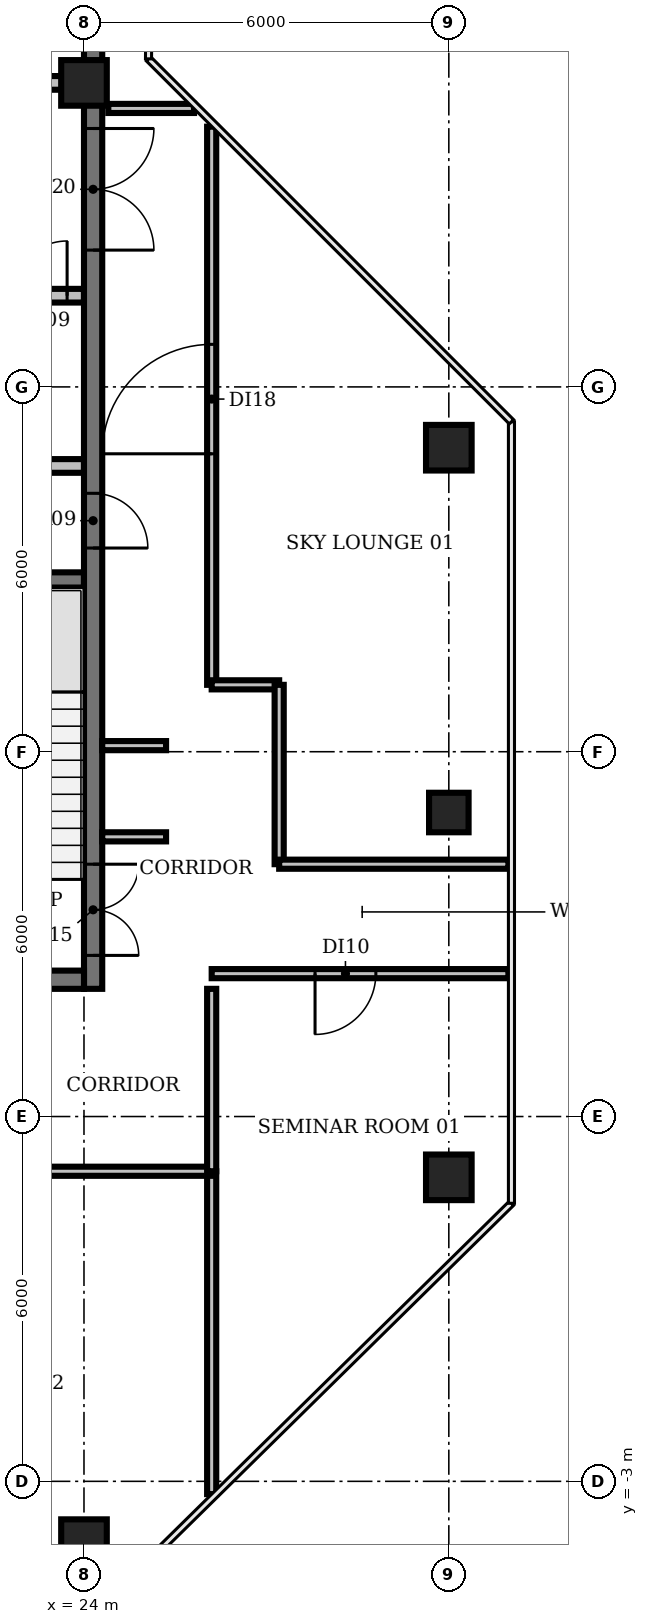
"""IFC4 building model, lengths in metres.
Left out: names, types, materials, properties, quantities, classifications, styles, units other than length and angle.
Written with IfcOpenShell. Run it as: python <this file> out.ifc"""

import sys

from ifc_helpers import new_model, si_unit, direction, frame, frame_2d, origin, origin_2d, place, context, subcontext, project, spatial, rectangle, circle, extrude, element, fill, save


model = new_model("IFC4")
c1 = context("Model", 3, precision=1e-05, world=origin(), true_north=direction((0.0, 1.0)))
c2 = subcontext(c1, "Body", "Model", "MODEL_VIEW")
j1 = project(units=[si_unit("LENGTHUNIT", "METRE"), si_unit("PLANEANGLEUNIT", "RADIAN")], contexts=[c1])
p1 = place(None, origin())
s1 = spatial("IfcSite", under=j1, at=p1, CompositionType="ELEMENT")
p2 = place(p1, origin())
s2 = spatial("IfcBuilding", under=s1, at=p2, CompositionType="ELEMENT")
p3 = place(p2, frame((0.0, 0.0, 335.6)))
s3 = spatial("IfcBuildingStorey", under=s2, at=p3, CompositionType="ELEMENT", Elevation=335.6)
for number, where, z_axis, x_axis in (
    (1, (24.0, -4.0, 0.0), (0.0, 0.0, 1.0), (1.0, 0.0, 0.0)),
    (2, (24.0, 20.0, 0.0), (0.0, 0.0, 1.0), (1.0, 0.0, 0.0)),
    (3, (30.0, 2.0, 0.0), (0.0, 0.0, 1.0), (1.0, 0.0, 0.0)),
):
    element("IfcColumn", number, at=place(p3, frame(where, z_axis=z_axis, x_axis=x_axis)), inside=s3, PredefinedType="COLUMN", context=c2, shape_type="SweptSolid", body=[
        extrude(circle(Radius=0.375, at=origin_2d()), origin(), (0.0, 0.0, 1.0), 3.9),
    ])
p4 = place(p3, frame((30.0, 8.0, 0.0), z_axis=(0.0, 0.0, 1.0), x_axis=(1.0, 0.0, 0.0)))
e4 = element("IfcColumn", 4, at=p4, inside=s3, PredefinedType="COLUMN", context=c2, shape_type="SweptSolid", body=[
    extrude(rectangle(XDim=0.65, YDim=0.65, at=origin_2d()), origin(), (0.0, 0.0, 1.0), 3.9),
])
p5 = place(p3, frame((30.0, 14.0, 0.0), z_axis=(0.0, 0.0, 1.0), x_axis=(1.0, 0.0, 0.0)))
e5 = element("IfcColumn", 5, at=p5, inside=s3, PredefinedType="COLUMN", context=c2, shape_type="SweptSolid", body=[
    extrude(circle(Radius=0.375, at=origin_2d()), origin(), (0.0, 0.0, 1.0), 3.9),
])
p6 = place(p3, frame((20.85, 11.825, 0.0), z_axis=(0.0, 0.0, 1.0), x_axis=(1.0, 0.0, 0.0)))
e6 = element("IfcWall", 6, at=p6, inside=s3, PredefinedType="SHEAR", context=c2, shape_type="SweptSolid", body=[
    extrude(rectangle(XDim=3.15, YDim=0.25, at=frame_2d((1.575, 0.0))), origin(), (0.0, 0.0, 1.0), 3.9),
])
p7 = place(p3, frame((16.6, 13.7, 0.0), z_axis=(0.0, 0.0, 1.0), x_axis=(1.0, 0.0, 0.0)))
e7 = element("IfcWall", 7, at=p7, inside=s3, PredefinedType="PARTITIONING", context=c2, shape_type="SweptSolid", body=[
    extrude(rectangle(XDim=7.4, YDim=0.225, at=frame_2d((3.7, 0.0))), origin(), (0.0, 0.0, 1.0), 3.9),
])
p8 = place(p3, frame((9.4, 16.5, 0.0), z_axis=(0.0, 0.0, 1.0), x_axis=(1.0, 0.0, 0.0)))
e8 = element("IfcWall", 8, at=p8, inside=s3, PredefinedType="PARTITIONING", context=c2, shape_type="SweptSolid", body=[
    extrude(rectangle(XDim=14.6, YDim=0.225, at=frame_2d((7.3, 0.0))), origin(), (0.0, 0.0, 1.0), 3.9),
])
p9 = place(p8, frame((0.85, 0.0, 0.0)))
e9 = element("IfcOpeningElement", 9, at=p9, cuts=e8, PredefinedType="OPENING", context=c2, shape_type="SweptSolid", body=[
    extrude(rectangle(XDim=0.9, YDim=2.1, at=frame_2d((0.45, 1.05))), frame((0.0, 0.123, 0.0), z_axis=(0.0, -1.0, 0.0), x_axis=(1.0, 0.0, 0.0)), (0.0, 0.0, 1.0), 0.245),
])
p10 = place(p8, frame((3.625, 0.0, 0.0)))
e10 = element("IfcOpeningElement", 10, at=p10, cuts=e8, PredefinedType="OPENING", context=c2, shape_type="SweptSolid", body=[
    extrude(rectangle(XDim=0.9, YDim=2.1, at=frame_2d((0.45, 1.05))), frame((0.0, 0.123, 0.0), z_axis=(0.0, -1.0, 0.0), x_axis=(1.0, 0.0, 0.0)), (0.0, 0.0, 1.0), 0.245),
])
p11 = place(p8, frame((7.775, 0.0, 0.0)))
e11 = element("IfcOpeningElement", 11, at=p11, cuts=e8, PredefinedType="OPENING", context=c2, shape_type="SweptSolid", body=[
    extrude(rectangle(XDim=1.0, YDim=2.1, at=frame_2d((0.5, 1.05))), frame((0.0, 0.123, 0.0), z_axis=(0.0, -1.0, 0.0), x_axis=(1.0, 0.0, 0.0)), (0.0, 0.0, 1.0), 0.245),
])
p12 = place(p8, frame((11.647, 0.0, 0.0)))
e12 = element("IfcOpeningElement", 12, at=p12, cuts=e8, PredefinedType="OPENING", context=c2, shape_type="SweptSolid", body=[
    extrude(rectangle(XDim=0.9, YDim=2.1, at=frame_2d((0.45, 1.05))), frame((0.0, 0.123, 0.0), z_axis=(0.0, -1.0, 0.0), x_axis=(1.0, 0.0, 0.0)), (0.0, 0.0, 1.0), 0.245),
])
p13 = place(p8, frame((13.423, 0.0, 0.0)))
e13 = element("IfcOpeningElement", 13, at=p13, cuts=e8, PredefinedType="OPENING", context=c2, shape_type="SweptSolid", body=[
    extrude(rectangle(XDim=0.9, YDim=2.1, at=frame_2d((0.45, 1.05))), frame((0.0, 0.123, 0.0), z_axis=(0.0, -1.0, 0.0), x_axis=(1.0, 0.0, 0.0)), (0.0, 0.0, 1.0), 0.245),
])
p14 = place(p3, frame((24.0, 20.0, 0.0), z_axis=(0.0, 0.0, 1.0), x_axis=(-1.0, 0.0, 0.0)))
e14 = element("IfcWall", 14, at=p14, inside=s3, PredefinedType="PARTITIONING", context=c2, shape_type="SweptSolid", body=[
    extrude(rectangle(XDim=14.6, YDim=0.225, at=frame_2d((7.3, 0.0))), origin(), (0.0, 0.0, 1.0), 3.9),
])
p15 = place(p14, frame((12.75, 0.0, 0.0)))
e15 = element("IfcOpeningElement", 15, at=p15, cuts=e14, PredefinedType="OPENING", context=c2, shape_type="SweptSolid", body=[
    extrude(rectangle(XDim=1.1, YDim=2.1, at=frame_2d((0.55, 1.05))), frame((0.0, 0.123, 0.0), z_axis=(0.0, -1.0, 0.0), x_axis=(1.0, 0.0, 0.0)), (0.0, 0.0, 1.0), 0.245),
])
p16 = place(p14, frame((9.95, 0.0, 0.0)))
e16 = element("IfcOpeningElement", 16, at=p16, cuts=e14, PredefinedType="OPENING", context=c2, shape_type="SweptSolid", body=[
    extrude(rectangle(XDim=1.1, YDim=2.1, at=frame_2d((0.55, 1.05))), frame((0.0, 0.123, 0.0), z_axis=(0.0, -1.0, 0.0), x_axis=(1.0, 0.0, 0.0)), (0.0, 0.0, 1.0), 0.245),
])
p17 = place(p14, frame((7.15, 0.0, 0.0)))
e17 = element("IfcOpeningElement", 17, at=p17, cuts=e14, PredefinedType="OPENING", context=c2, shape_type="SweptSolid", body=[
    extrude(rectangle(XDim=1.1, YDim=2.1, at=frame_2d((0.55, 1.05))), frame((0.0, 0.123, 0.0), z_axis=(0.0, -1.0, 0.0), x_axis=(1.0, 0.0, 0.0)), (0.0, 0.0, 1.0), 0.245),
])
p18 = place(p14, frame((4.35, 0.0, 0.0)))
e18 = element("IfcOpeningElement", 18, at=p18, cuts=e14, PredefinedType="OPENING", context=c2, shape_type="SweptSolid", body=[
    extrude(rectangle(XDim=1.1, YDim=2.1, at=frame_2d((0.55, 1.05))), frame((0.0, 0.123, 0.0), z_axis=(0.0, -1.0, 0.0), x_axis=(1.0, 0.0, 0.0)), (0.0, 0.0, 1.0), 0.245),
])
p19 = place(p14, frame((2.137, 0.0, 0.0)))
e19 = element("IfcOpeningElement", 19, at=p19, cuts=e14, PredefinedType="OPENING", context=c2, shape_type="SweptSolid", body=[
    extrude(rectangle(XDim=0.9, YDim=2.1, at=frame_2d((0.45, 1.05))), frame((0.0, 0.123, 0.0), z_axis=(0.0, -1.0, 0.0), x_axis=(1.0, 0.0, 0.0)), (0.0, 0.0, 1.0), 0.245),
])
p20 = place(p14, frame((0.562, 0.0, 0.0)))
e20 = element("IfcOpeningElement", 20, at=p20, cuts=e14, PredefinedType="OPENING", context=c2, shape_type="SweptSolid", body=[
    extrude(rectangle(XDim=0.9, YDim=2.1, at=frame_2d((0.45, 1.05))), frame((0.0, 0.123, 0.0), z_axis=(0.0, -1.0, 0.0), x_axis=(1.0, 0.0, 0.0)), (0.0, 0.0, 1.0), 0.245),
])
p21 = place(p3, frame((24.15, 25.705, 0.0), z_axis=(0.0, 0.0, 1.0), x_axis=(0.0, -1.0, 0.0)))
e21 = element("IfcWall", 21, at=p21, inside=s3, PredefinedType="SHEAR", context=c2, shape_type="SweptSolid", body=[
    extrude(rectangle(XDim=20.605, YDim=0.3, at=frame_2d((10.302, 0.0))), origin(), (0.0, 0.0, 1.0), 3.9),
])
p22 = place(p21, frame((18.555, 0.0, 0.0)))
e22 = element("IfcOpeningElement", 22, at=p22, cuts=e21, PredefinedType="OPENING", context=c2, shape_type="SweptSolid", body=[
    extrude(rectangle(XDim=1.5, YDim=2.1, at=frame_2d((0.75, 1.05))), frame((0.0, 0.16, 0.0), z_axis=(0.0, -1.0, 0.0), x_axis=(1.0, 0.0, 0.0)), (0.0, 0.0, 1.0), 0.32),
])
p23 = place(p21, frame((12.455, 0.0, 0.0)))
e23 = element("IfcOpeningElement", 23, at=p23, cuts=e21, PredefinedType="OPENING", context=c2, shape_type="SweptSolid", body=[
    extrude(rectangle(XDim=0.9, YDim=2.1, at=frame_2d((0.45, 1.05))), frame((0.0, 0.16, 0.0), z_axis=(0.0, -1.0, 0.0), x_axis=(1.0, 0.0, 0.0)), (0.0, 0.0, 1.0), 0.32),
])
p24 = place(p21, frame((6.455, 0.0, 0.0)))
e24 = element("IfcOpeningElement", 24, at=p24, cuts=e21, PredefinedType="OPENING", context=c2, shape_type="SweptSolid", body=[
    extrude(rectangle(XDim=2.0, YDim=2.1, at=frame_2d((1.0, 1.05))), frame((0.0, 0.16, 0.0), z_axis=(0.0, -1.0, 0.0), x_axis=(1.0, 0.0, 0.0)), (0.0, 0.0, 1.0), 0.32),
])
p25 = place(p3, frame((24.0, 5.25, 0.0), z_axis=(0.0, 0.0, 1.0), x_axis=(-1.0, 0.0, 0.0)))
e25 = element("IfcWall", 25, at=p25, inside=s3, PredefinedType="SHEAR", context=c2, shape_type="SweptSolid", body=[
    extrude(rectangle(XDim=18.0, YDim=0.3, at=frame_2d((9.0, 0.0))), origin(), (0.0, 0.0, 1.0), 3.9),
])
p26 = place(p25, frame((13.0, 0.0, 0.0)))
e26 = element("IfcOpeningElement", 26, at=p26, cuts=e25, PredefinedType="OPENING", context=c2, shape_type="SweptSolid", body=[
    extrude(rectangle(XDim=1.2, YDim=2.1, at=frame_2d((0.6, 1.05))), frame((0.0, 0.16, 0.0), z_axis=(0.0, -1.0, 0.0), x_axis=(1.0, 0.0, 0.0)), (0.0, 0.0, 1.0), 0.32),
])
p27 = place(p25, frame((4.9, 0.0, 0.0)))
e27 = element("IfcOpeningElement", 27, at=p27, cuts=e25, PredefinedType="OPENING", context=c2, shape_type="SweptSolid", body=[
    extrude(rectangle(XDim=1.0, YDim=2.1, at=frame_2d((0.5, 1.05))), frame((0.0, 0.16, 0.0), z_axis=(0.0, -1.0, 0.0), x_axis=(1.0, 0.0, 0.0)), (0.0, 0.0, 1.0), 0.32),
])
for number, where, z_axis, x_axis in (
    (28, (24.3, 7.6, 0.0), (0.0, 0.0, 1.0), (1.0, 0.0, 0.0)),
    (29, (24.3, 9.1, 0.0), (0.0, 0.0, 1.0), (1.0, 0.0, 0.0)),
):
    element("IfcWall", number, at=place(p3, frame(where, z_axis=z_axis, x_axis=x_axis)), inside=s3, PredefinedType="PARTITIONING", context=c2, shape_type="SweptSolid", body=[
        extrude(rectangle(XDim=1.05, YDim=0.15, at=frame_2d((0.525, 0.0))), origin(), (0.0, 0.0, 1.0), 2.95),
    ])
p28 = place(p3, frame((24.4, 19.58, 0.0), z_axis=(0.0, 0.0, 1.0), x_axis=(1.0, 0.0, 0.0)))
e30 = element("IfcWall", 30, at=p28, inside=s3, PredefinedType="PARTITIONING", context=c2, shape_type="SweptSolid", body=[
    extrude(rectangle(XDim=1.41, YDim=0.15, at=frame_2d((0.705, 0.0))), origin(), (0.0, 0.0, 1.0), 2.95),
])
p29 = place(p3, frame((26.1, -3.21, 0.0), z_axis=(0.0, 0.0, 1.0), x_axis=(0.0, 1.0, 0.0)))
e31 = element("IfcWall", 31, at=p29, inside=s3, PredefinedType="PARTITIONING", context=c2, shape_type="SweptSolid", body=[
    extrude(rectangle(XDim=5.31, YDim=0.15, at=frame_2d((2.655, 0.0))), origin(), (0.0, 0.0, 1.0), 2.95),
])
p30 = place(p3, frame((26.1, 2.1, 0.0), z_axis=(0.0, 0.0, 1.0), x_axis=(-1.0, 0.0, 0.0)))
e32 = element("IfcWall", 32, at=p30, inside=s3, PredefinedType="PARTITIONING", context=c2, shape_type="SweptSolid", body=[
    extrude(rectangle(XDim=22.2, YDim=0.15, at=frame_2d((11.1, 0.0))), origin(), (0.0, 0.0, 1.0), 2.95),
])
p31 = place(p30, frame((10.6, 0.0, 0.0)))
e33 = element("IfcOpeningElement", 33, at=p31, cuts=e32, PredefinedType="OPENING", context=c2, shape_type="SweptSolid", body=[
    extrude(rectangle(XDim=1.2, YDim=2.1, at=frame_2d((0.6, 1.05))), frame((0.0, 0.085, 0.0), z_axis=(0.0, -1.0, 0.0), x_axis=(1.0, 0.0, 0.0)), (0.0, 0.0, 1.0), 0.17),
])
p32 = place(p3, frame((26.1, 2.1, 0.0), z_axis=(0.0, 0.0, 1.0), x_axis=(0.0, 1.0, 0.0)))
e34 = element("IfcWall", 34, at=p32, inside=s3, PredefinedType="PARTITIONING", context=c2, shape_type="SweptSolid", body=[
    extrude(rectangle(XDim=3.0, YDim=0.15, at=frame_2d((1.5, 0.0))), origin(), (0.0, 0.0, 1.0), 2.95),
])
p33 = place(p3, frame((26.1, 10.1, 0.0), z_axis=(0.0, 0.0, 1.0), x_axis=(0.0, 1.0, 0.0)))
e35 = element("IfcWall", 35, at=p33, inside=s3, PredefinedType="PARTITIONING", context=c2, shape_type="SweptSolid", body=[
    extrude(rectangle(XDim=9.18, YDim=0.15, at=frame_2d((4.59, 0.0))), origin(), (0.0, 0.0, 1.0), 2.95),
])
p34 = place(p33, frame((3.8, 0.0, 0.0)))
e36 = element("IfcOpeningElement", 36, at=p34, cuts=e35, PredefinedType="OPENING", context=c2, shape_type="SweptSolid", body=[
    extrude(rectangle(XDim=1.8, YDim=2.1, at=frame_2d((0.9, 1.05))), frame((0.0, 0.085, 0.0), z_axis=(0.0, -1.0, 0.0), x_axis=(1.0, 0.0, 0.0)), (0.0, 0.0, 1.0), 0.17),
])
p35 = place(p3, frame((26.1, 10.1, 0.0), z_axis=(0.0, 0.0, 1.0), x_axis=(1.0, 0.0, 0.0)))
e37 = element("IfcWall", 37, at=p35, inside=s3, PredefinedType="PARTITIONING", context=c2, shape_type="SweptSolid", body=[
    extrude(rectangle(XDim=1.11, YDim=0.15, at=frame_2d((0.555, 0.0))), origin(), (0.0, 0.0, 1.0), 2.95),
])
p36 = place(p3, frame((27.21, 7.15, 0.0), z_axis=(0.0, 0.0, 1.0), x_axis=(0.0, 1.0, 0.0)))
e38 = element("IfcWall", 38, at=p36, inside=s3, PredefinedType="PARTITIONING", context=c2, shape_type="SweptSolid", body=[
    extrude(rectangle(XDim=2.95, YDim=0.15, at=frame_2d((1.475, 0.0))), origin(), (0.0, 0.0, 1.0), 2.95),
])
p37 = place(p3, frame((27.21, 7.15, 0.0), z_axis=(0.0, 0.0, 1.0), x_axis=(1.0, 0.0, 0.0)))
e39 = element("IfcWall", 39, at=p37, inside=s3, PredefinedType="PARTITIONING", context=c2, shape_type="SweptSolid", body=[
    extrude(rectangle(XDim=3.77, YDim=0.15, at=frame_2d((1.885, 0.0))), origin(), (0.0, 0.0, 1.0), 2.95),
])
p38 = place(p3, frame((30.98, 5.35, 0.0), z_axis=(0.0, 0.0, 1.0), x_axis=(-1.0, 0.0, 0.0)))
e40 = element("IfcWall", 40, at=p38, inside=s3, PredefinedType="PARTITIONING", context=c2, shape_type="SweptSolid", body=[
    extrude(rectangle(XDim=4.88, YDim=0.15, at=frame_2d((2.44, 0.0))), origin(), (0.0, 0.0, 1.0), 2.95),
])
p39 = place(p38, frame((2.18, 0.0, 0.0)))
e41 = element("IfcOpeningElement", 41, at=p39, cuts=e40, PredefinedType="OPENING", context=c2, shape_type="SweptSolid", body=[
    extrude(rectangle(XDim=1.0, YDim=2.1, at=frame_2d((0.5, 1.05))), frame((0.0, 0.085, 0.0), z_axis=(0.0, -1.0, 0.0), x_axis=(1.0, 0.0, 0.0)), (0.0, 0.0, 1.0), 0.17),
])
p40 = place(p13, origin())
e42 = element("IfcDoor", 42, at=p40, inside=s3, OperationType="SINGLE_SWING_RIGHT", PredefinedType="DOOR", context=c2, shape_type="SweptSolid", body=[
    extrude(rectangle(XDim=0.9, YDim=2.1, at=frame_2d((0.45, 1.05))), frame((0.0, 0.025, 0.0), z_axis=(0.0, -1.0, 0.0), x_axis=(1.0, 0.0, 0.0)), (0.0, 0.0, 1.0), 0.05),
])
fill(e13, e42)
p41 = place(p22, origin())
e43 = element("IfcDoor", 43, at=p41, inside=s3, OperationType="DOUBLE_DOOR_SINGLE_SWING", PredefinedType="DOOR", context=c2, shape_type="SweptSolid", body=[
    extrude(rectangle(XDim=1.5, YDim=2.1, at=frame_2d((0.75, 1.05))), frame((0.0, 0.025, 0.0), z_axis=(0.0, -1.0, 0.0), x_axis=(1.0, 0.0, 0.0)), (0.0, 0.0, 1.0), 0.05),
])
fill(e22, e43)
p42 = place(p23, origin())
e44 = element("IfcDoor", 44, at=p42, inside=s3, OperationType="SINGLE_SWING_RIGHT", PredefinedType="DOOR", context=c2, shape_type="SweptSolid", body=[
    extrude(rectangle(XDim=0.9, YDim=2.1, at=frame_2d((0.45, 1.05))), frame((0.0, 0.025, 0.0), z_axis=(0.0, -1.0, 0.0), x_axis=(1.0, 0.0, 0.0)), (0.0, 0.0, 1.0), 0.05),
])
fill(e23, e44)
p43 = place(p24, origin())
e45 = element("IfcDoor", 45, at=p43, inside=s3, OperationType="DOUBLE_DOOR_SINGLE_SWING", PredefinedType="DOOR", context=c2, shape_type="SweptSolid", body=[
    extrude(rectangle(XDim=2.0, YDim=2.1, at=frame_2d((1.0, 1.05))), frame((0.0, 0.025, 0.0), z_axis=(0.0, -1.0, 0.0), x_axis=(1.0, 0.0, 0.0)), (0.0, 0.0, 1.0), 0.05),
])
fill(e24, e45)
p44 = place(p34, origin())
e46 = element("IfcDoor", 46, at=p44, inside=s3, OperationType="SINGLE_SWING_LEFT", PredefinedType="DOOR", context=c2, shape_type="SweptSolid", body=[
    extrude(rectangle(XDim=1.8, YDim=2.1, at=frame_2d((0.9, 1.05))), frame((0.0, 0.025, 0.0), z_axis=(0.0, -1.0, 0.0), x_axis=(1.0, 0.0, 0.0)), (0.0, 0.0, 1.0), 0.05),
])
fill(e36, e46)
p45 = place(p39, origin())
e47 = element("IfcDoor", 47, at=p45, inside=s3, OperationType="SINGLE_SWING_RIGHT", PredefinedType="DOOR", context=c2, shape_type="SweptSolid", body=[
    extrude(rectangle(XDim=1.0, YDim=2.1, at=frame_2d((0.5, 1.05))), frame((0.0, 0.025, 0.0), z_axis=(0.0, -1.0, 0.0), x_axis=(1.0, 0.0, 0.0)), (0.0, 0.0, 1.0), 0.05),
])
fill(e41, e47)
save(model, sys.argv[1])
